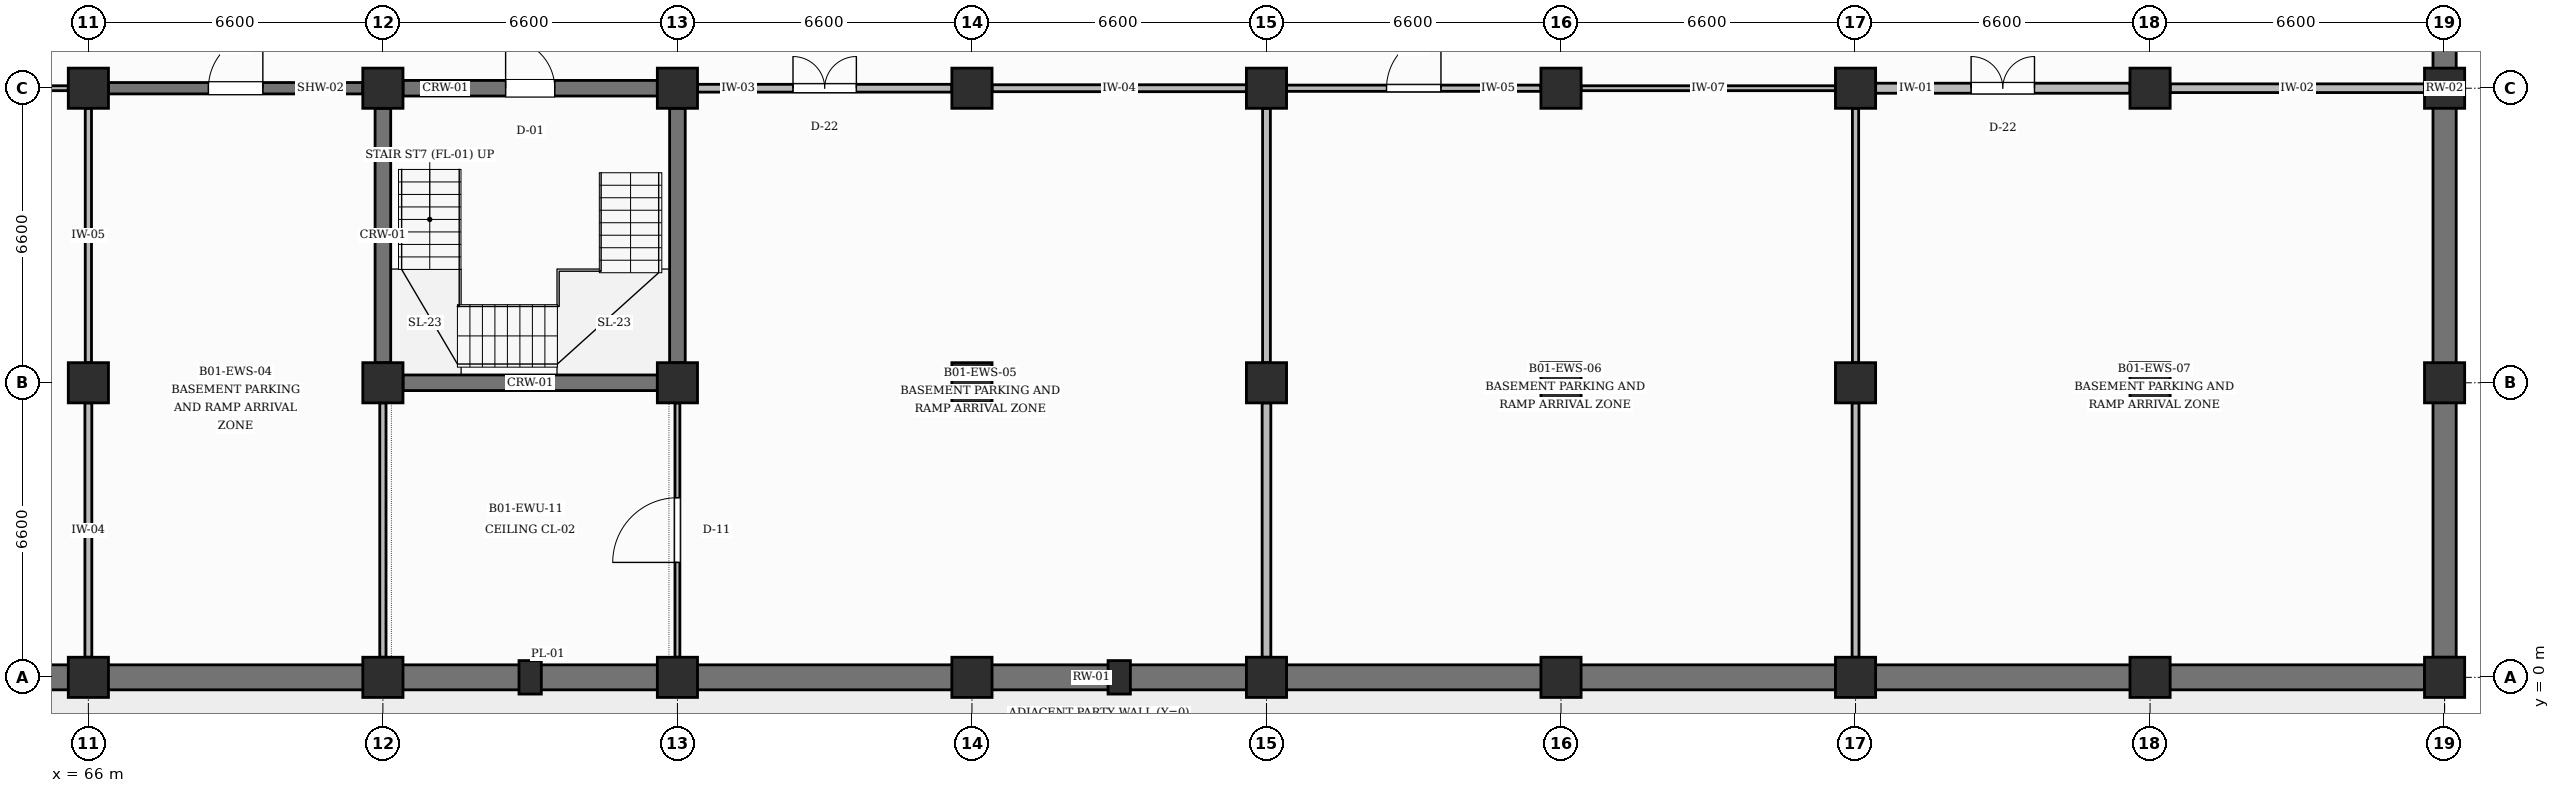
"""IFC4 building model, lengths in metres.
Left out: names, types, materials, properties, quantities, classifications, styles, units other than length and angle.
Written with IfcOpenShell. Run it as: python <this file> out.ifc"""

import sys

from ifc_helpers import new_model, si_unit, direction, frame, frame_2d, origin, origin_2d, place, context, subcontext, project, spatial, rectangle, extrude, element, fill, save


model = new_model("IFC4")
c1 = context("Model", 3, precision=1e-05, world=origin(), true_north=direction((0.0, 1.0)))
c2 = subcontext(c1, "Body", "Model", "MODEL_VIEW")
j1 = project(units=[si_unit("LENGTHUNIT", "METRE"), si_unit("PLANEANGLEUNIT", "RADIAN")], contexts=[c1])
p1 = place(None, origin())
s1 = spatial("IfcSite", under=j1, at=p1, CompositionType="ELEMENT")
p2 = place(p1, origin())
s2 = spatial("IfcBuilding", under=s1, at=p2, CompositionType="ELEMENT")
p3 = place(p2, frame((0.0, 0.0, -4.5)))
s3 = spatial("IfcBuildingStorey", under=s2, at=p3, CompositionType="ELEMENT", Elevation=-4.5)
for number, where, z_axis, x_axis in (
    (1, (75.9, 0.0, 0.0), (0.0, 0.0, 1.0), (1.0, 0.0, 0.0)),
    (2, (89.1, 0.0, 0.0), (0.0, 0.0, 1.0), (1.0, 0.0, 0.0)),
):
    element("IfcColumn", number, at=place(p3, frame(where, z_axis=z_axis, x_axis=x_axis)), inside=s3, PredefinedType="PILASTER", context=c2, shape_type="SweptSolid", body=[
        extrude(rectangle(XDim=0.5, YDim=0.75, at=origin_2d()), origin(), (0.0, 0.0, 1.0), 4.5),
    ])
for number, where, z_axis, x_axis in (
    (3, (66.0, 0.0, 0.0), (0.0, 0.0, 1.0), (1.0, 0.0, 0.0)),
    (4, (66.0, 6.6, 0.0), (0.0, 0.0, 1.0), (1.0, 0.0, 0.0)),
    (5, (66.0, 13.2, 0.0), (0.0, 0.0, 1.0), (1.0, 0.0, 0.0)),
    (6, (72.6, 0.0, 0.0), (0.0, 0.0, 1.0), (1.0, 0.0, 0.0)),
    (7, (72.6, 6.6, 0.0), (0.0, 0.0, 1.0), (1.0, 0.0, 0.0)),
    (8, (72.6, 13.2, 0.0), (0.0, 0.0, 1.0), (1.0, 0.0, 0.0)),
    (9, (79.2, 0.0, 0.0), (0.0, 0.0, 1.0), (1.0, 0.0, 0.0)),
    (10, (79.2, 6.6, 0.0), (0.0, 0.0, 1.0), (1.0, 0.0, 0.0)),
    (11, (79.2, 13.2, 0.0), (0.0, 0.0, 1.0), (1.0, 0.0, 0.0)),
    (12, (85.8, 0.0, 0.0), (0.0, 0.0, 1.0), (1.0, 0.0, 0.0)),
    (13, (85.8, 6.6, 0.0), (0.0, 0.0, 1.0), (1.0, 0.0, 0.0)),
    (14, (85.8, 13.2, 0.0), (0.0, 0.0, 1.0), (1.0, 0.0, 0.0)),
    (15, (92.4, 0.0, 0.0), (0.0, 0.0, 1.0), (1.0, 0.0, 0.0)),
    (16, (92.4, 6.6, 0.0), (0.0, 0.0, 1.0), (1.0, 0.0, 0.0)),
    (17, (92.4, 13.2, 0.0), (0.0, 0.0, 1.0), (1.0, 0.0, 0.0)),
    (18, (99.0, 0.0, 0.0), (0.0, 0.0, 1.0), (1.0, 0.0, 0.0)),
    (19, (99.0, 6.6, 0.0), (0.0, 0.0, 1.0), (1.0, 0.0, 0.0)),
    (20, (99.0, 13.2, 0.0), (0.0, 0.0, 1.0), (1.0, 0.0, 0.0)),
    (21, (105.6, 0.0, 0.0), (0.0, 0.0, 1.0), (1.0, 0.0, 0.0)),
    (22, (105.6, 6.6, 0.0), (0.0, 0.0, 1.0), (1.0, 0.0, 0.0)),
    (23, (105.6, 13.2, 0.0), (0.0, 0.0, 1.0), (1.0, 0.0, 0.0)),
    (24, (112.2, 0.0, 0.0), (0.0, 0.0, 1.0), (1.0, 0.0, 0.0)),
    (25, (112.2, 6.6, 0.0), (0.0, 0.0, 1.0), (1.0, 0.0, 0.0)),
    (26, (112.2, 13.2, 0.0), (0.0, 0.0, 1.0), (1.0, 0.0, 0.0)),
    (27, (118.8, 0.0, 0.0), (0.0, 0.0, 1.0), (1.0, 0.0, 0.0)),
    (28, (118.8, 6.6, 0.0), (0.0, 0.0, 1.0), (1.0, 0.0, 0.0)),
    (29, (118.8, 13.2, 0.0), (0.0, 0.0, 1.0), (1.0, 0.0, 0.0)),
):
    element("IfcColumn", number, at=place(p3, frame(where, z_axis=z_axis, x_axis=x_axis)), inside=s3, PredefinedType="COLUMN", context=c2, shape_type="SweptSolid", body=[
        extrude(rectangle(XDim=0.9, YDim=0.9, at=origin_2d()), origin(), (0.0, 0.0, 1.0), 4.5),
    ])
for number, where, z_axis, x_axis in (
    (30, (59.85, 0.0, 0.0), (0.0, 0.0, 1.0), (1.0, 0.0, 0.0)),
    (31, (66.45, 0.0, 0.0), (0.0, 0.0, 1.0), (1.0, 0.0, 0.0)),
    (32, (73.05, 0.0, 0.0), (0.0, 0.0, 1.0), (1.0, 0.0, 0.0)),
):
    element("IfcWall", number, at=place(p3, frame(where, z_axis=z_axis, x_axis=x_axis)), inside=s3, PredefinedType="USERDEFINED", context=c2, shape_type="SweptSolid", body=[
        extrude(rectangle(XDim=5.7, YDim=0.56, at=frame_2d((2.85, 0.0))), origin(), (0.0, 0.0, 1.0), 3.49),
    ])
p4 = place(p3, frame((79.65, 0.0, 0.0), z_axis=(0.0, 0.0, 1.0), x_axis=(1.0, 0.0, 0.0)))
e33 = element("IfcWall", 33, at=p4, inside=s3, PredefinedType="USERDEFINED", context=c2, shape_type="SweptSolid", body=[
    extrude(rectangle(XDim=5.7, YDim=0.56, at=frame_2d((2.85, 0.0))), origin(), (0.0, 0.0, 1.0), 3.49),
])
for number, where, z_axis, x_axis in (
    (34, (86.25, 0.0, 0.0), (0.0, 0.0, 1.0), (1.0, 0.0, 0.0)),
    (35, (92.85, 0.0, 0.0), (0.0, 0.0, 1.0), (1.0, 0.0, 0.0)),
    (36, (99.45, 0.0, 0.0), (0.0, 0.0, 1.0), (1.0, 0.0, 0.0)),
    (37, (106.05, 0.0, 0.0), (0.0, 0.0, 1.0), (1.0, 0.0, 0.0)),
):
    element("IfcWall", number, at=place(p3, frame(where, z_axis=z_axis, x_axis=x_axis)), inside=s3, PredefinedType="USERDEFINED", context=c2, shape_type="SweptSolid", body=[
        extrude(rectangle(XDim=5.7, YDim=0.56, at=frame_2d((2.85, 0.0))), origin(), (0.0, 0.0, 1.0), 3.49),
    ])
p5 = place(p3, frame((112.65, 0.0, 0.0), z_axis=(0.0, 0.0, 1.0), x_axis=(1.0, 0.0, 0.0)))
e38 = element("IfcWall", 38, at=p5, inside=s3, PredefinedType="USERDEFINED", context=c2, shape_type="SweptSolid", body=[
    extrude(rectangle(XDim=5.7, YDim=0.56, at=frame_2d((2.85, 0.0))), origin(), (0.0, 0.0, 1.0), 3.49),
])
for number, where, z_axis, x_axis in (
    (39, (118.8, 0.45, 0.0), (0.0, 0.0, 1.0), (0.0, 1.0, 0.0)),
    (40, (118.8, 7.05, 0.0), (0.0, 0.0, 1.0), (0.0, 1.0, 0.0)),
):
    element("IfcWall", number, at=place(p3, frame(where, z_axis=z_axis, x_axis=x_axis)), inside=s3, PredefinedType="USERDEFINED", context=c2, shape_type="SweptSolid", body=[
        extrude(rectangle(XDim=5.7, YDim=0.52, at=frame_2d((2.85, 0.0))), origin(), (0.0, 0.0, 1.0), 3.49),
    ])
p6 = place(p3, frame((118.8, 13.65, 0.0), z_axis=(0.0, 0.0, 1.0), x_axis=(0.0, 1.0, 0.0)))
e41 = element("IfcWall", 41, at=p6, inside=s3, PredefinedType="USERDEFINED", context=c2, shape_type="SweptSolid", body=[
    extrude(rectangle(XDim=5.7, YDim=0.52, at=frame_2d((2.85, 0.0))), origin(), (0.0, 0.0, 1.0), 3.49),
])
p7 = place(p3, frame((73.05, 6.6, 0.0), z_axis=(0.0, 0.0, 1.0), x_axis=(1.0, 0.0, 0.0)))
e42 = element("IfcWall", 42, at=p7, inside=s3, PredefinedType="SHEAR", context=c2, shape_type="SweptSolid", body=[
    extrude(rectangle(XDim=5.7, YDim=0.35, at=frame_2d((2.85, 0.0))), origin(), (0.0, 0.0, 1.0), 3.24),
])
p8 = place(p3, frame((73.05, 13.2, 0.0), z_axis=(0.0, 0.0, 1.0), x_axis=(1.0, 0.0, 0.0)))
e43 = element("IfcWall", 43, at=p8, inside=s3, PredefinedType="SHEAR", context=c2, shape_type="SweptSolid", body=[
    extrude(rectangle(XDim=5.7, YDim=0.35, at=frame_2d((2.85, 0.0))), origin(), (0.0, 0.0, 1.0), 3.34),
])
p9 = place(p8, frame((2.3, 0.0, 0.0)))
e44 = element("IfcOpeningElement", 44, at=p9, cuts=e43, PredefinedType="OPENING", context=c2, shape_type="SweptSolid", body=[
    extrude(rectangle(XDim=1.1, YDim=2.15, at=frame_2d((0.55, 1.075))), frame((0.0, 0.185, 0.0), z_axis=(0.0, -1.0, 0.0), x_axis=(1.0, 0.0, 0.0)), (0.0, 0.0, 1.0), 0.37),
])
for number, where, z_axis, x_axis in (
    (45, (72.6, 7.05, 0.0), (0.0, 0.0, 1.0), (0.0, 1.0, 0.0)),
    (46, (79.2, 7.05, 0.0), (0.0, 0.0, 1.0), (0.0, 1.0, 0.0)),
):
    element("IfcWall", number, at=place(p3, frame(where, z_axis=z_axis, x_axis=x_axis)), inside=s3, PredefinedType="SHEAR", context=c2, shape_type="SweptSolid", body=[
        extrude(rectangle(XDim=5.7, YDim=0.35, at=frame_2d((2.85, 0.0))), origin(), (0.0, 0.0, 1.0), 3.34),
    ])
p10 = place(p3, frame((66.0, 0.45, 0.0), z_axis=(0.0, 0.0, 1.0), x_axis=(0.0, 1.0, 0.0)))
e47 = element("IfcWall", 47, at=p10, inside=s3, PredefinedType="PARTITIONING", context=c2, shape_type="SweptSolid", body=[
    extrude(rectangle(XDim=5.7, YDim=0.155, at=frame_2d((2.85, 0.0))), origin(), (0.0, 0.0, 1.0), 3.34),
])
p11 = place(p3, frame((66.0, 7.05, 0.0), z_axis=(0.0, 0.0, 1.0), x_axis=(0.0, 1.0, 0.0)))
e48 = element("IfcWall", 48, at=p11, inside=s3, PredefinedType="PARTITIONING", context=c2, shape_type="SweptSolid", body=[
    extrude(rectangle(XDim=5.7, YDim=0.14, at=frame_2d((2.85, 0.0))), origin(), (0.0, 0.0, 1.0), 3.34),
])
p12 = place(p3, frame((59.85, 13.2, 0.0), z_axis=(0.0, 0.0, 1.0), x_axis=(1.0, 0.0, 0.0)))
e49 = element("IfcWall", 49, at=p12, inside=s3, PredefinedType="PARTITIONING", context=c2, shape_type="SweptSolid", body=[
    extrude(rectangle(XDim=5.7, YDim=0.11, at=frame_2d((2.85, 0.0))), origin(), (0.0, 0.0, 1.0), 3.34),
])
p13 = place(p3, frame((72.6, 0.45, 0.0), z_axis=(0.0, 0.0, 1.0), x_axis=(0.0, 1.0, 0.0)))
e50 = element("IfcWall", 50, at=p13, inside=s3, PredefinedType="PARTITIONING", context=c2, shape_type="SweptSolid", body=[
    extrude(rectangle(XDim=5.7, YDim=0.14, at=frame_2d((2.85, 0.0))), origin(), (0.0, 0.0, 1.0), 3.34),
])
p14 = place(p3, frame((66.45, 13.2, 0.0), z_axis=(0.0, 0.0, 1.0), x_axis=(1.0, 0.0, 0.0)))
e51 = element("IfcWall", 51, at=p14, inside=s3, PredefinedType="SHEAR", context=c2, shape_type="SweptSolid", body=[
    extrude(rectangle(XDim=5.7, YDim=0.255, at=frame_2d((2.85, 0.0))), origin(), (0.0, 0.0, 1.0), 3.24),
])
p15 = place(p14, frame((2.24, 0.0, 0.0)))
e52 = element("IfcOpeningElement", 52, at=p15, cuts=e51, PredefinedType="OPENING", context=c2, shape_type="SweptSolid", body=[
    extrude(rectangle(XDim=1.22, YDim=2.15, at=frame_2d((0.61, 1.075))), frame((0.0, 0.137, 0.0), z_axis=(0.0, -1.0, 0.0), x_axis=(1.0, 0.0, 0.0)), (0.0, 0.0, 1.0), 0.275),
])
p16 = place(p3, frame((79.2, 0.45, 0.0), z_axis=(0.0, 0.0, 1.0), x_axis=(0.0, 1.0, 0.0)))
e53 = element("IfcWall", 53, at=p16, inside=s3, PredefinedType="PARTITIONING", context=c2, shape_type="SweptSolid", body=[
    extrude(rectangle(XDim=5.7, YDim=0.11, at=frame_2d((2.85, 0.0))), origin(), (0.0, 0.0, 1.0), 3.34),
])
p17 = place(p16, frame((2.125, 0.0, 0.0)))
e54 = element("IfcOpeningElement", 54, at=p17, cuts=e53, PredefinedType="OPENING", context=c2, shape_type="SweptSolid", body=[
    extrude(rectangle(XDim=1.45, YDim=2.25, at=frame_2d((0.725, 1.125))), frame((0.0, 0.065, 0.0), z_axis=(0.0, -1.0, 0.0), x_axis=(1.0, 0.0, 0.0)), (0.0, 0.0, 1.0), 0.13),
])
p18 = place(p3, frame((79.65, 13.2, 0.0), z_axis=(0.0, 0.0, 1.0), x_axis=(1.0, 0.0, 0.0)))
e55 = element("IfcWall", 55, at=p18, inside=s3, PredefinedType="PARTITIONING", context=c2, shape_type="SweptSolid", body=[
    extrude(rectangle(XDim=5.7, YDim=0.175, at=frame_2d((2.85, 0.0))), origin(), (0.0, 0.0, 1.0), 3.24),
])
p19 = place(p18, frame((2.14, 0.0, 0.0)))
e56 = element("IfcOpeningElement", 56, at=p19, cuts=e55, PredefinedType="OPENING", context=c2, shape_type="SweptSolid", body=[
    extrude(rectangle(XDim=1.42, YDim=2.2, at=frame_2d((0.71, 1.1))), frame((0.0, 0.097, 0.0), z_axis=(0.0, -1.0, 0.0), x_axis=(1.0, 0.0, 0.0)), (0.0, 0.0, 1.0), 0.195),
])
p20 = place(p3, frame((92.4, 0.45, 0.0), z_axis=(0.0, 0.0, 1.0), x_axis=(0.0, 1.0, 0.0)))
e57 = element("IfcWall", 57, at=p20, inside=s3, PredefinedType="PARTITIONING", context=c2, shape_type="SweptSolid", body=[
    extrude(rectangle(XDim=5.7, YDim=0.195, at=frame_2d((2.85, 0.0))), origin(), (0.0, 0.0, 1.0), 3.34),
])
p21 = place(p3, frame((92.4, 7.05, 0.0), z_axis=(0.0, 0.0, 1.0), x_axis=(0.0, 1.0, 0.0)))
e58 = element("IfcWall", 58, at=p21, inside=s3, PredefinedType="PARTITIONING", context=c2, shape_type="SweptSolid", body=[
    extrude(rectangle(XDim=5.7, YDim=0.175, at=frame_2d((2.85, 0.0))), origin(), (0.0, 0.0, 1.0), 3.34),
])
p22 = place(p3, frame((86.25, 13.2, 0.0), z_axis=(0.0, 0.0, 1.0), x_axis=(1.0, 0.0, 0.0)))
e59 = element("IfcWall", 59, at=p22, inside=s3, PredefinedType="PARTITIONING", context=c2, shape_type="SweptSolid", body=[
    extrude(rectangle(XDim=5.7, YDim=0.155, at=frame_2d((2.85, 0.0))), origin(), (0.0, 0.0, 1.0), 3.34),
])
p23 = place(p3, frame((92.85, 13.2, 0.0), z_axis=(0.0, 0.0, 1.0), x_axis=(1.0, 0.0, 0.0)))
e60 = element("IfcWall", 60, at=p23, inside=s3, PredefinedType="PARTITIONING", context=c2, shape_type="SweptSolid", body=[
    extrude(rectangle(XDim=5.7, YDim=0.14, at=frame_2d((2.85, 0.0))), origin(), (0.0, 0.0, 1.0), 3.24),
])
p24 = place(p23, frame((2.24, 0.0, 0.0)))
e61 = element("IfcOpeningElement", 61, at=p24, cuts=e60, PredefinedType="OPENING", context=c2, shape_type="SweptSolid", body=[
    extrude(rectangle(XDim=1.22, YDim=2.15, at=frame_2d((0.61, 1.075))), frame((0.0, 0.08, 0.0), z_axis=(0.0, -1.0, 0.0), x_axis=(1.0, 0.0, 0.0)), (0.0, 0.0, 1.0), 0.16),
])
p25 = place(p3, frame((105.6, 0.45, 0.0), z_axis=(0.0, 0.0, 1.0), x_axis=(0.0, 1.0, 0.0)))
e62 = element("IfcWall", 62, at=p25, inside=s3, PredefinedType="PARTITIONING", context=c2, shape_type="SweptSolid", body=[
    extrude(rectangle(XDim=5.7, YDim=0.155, at=frame_2d((2.85, 0.0))), origin(), (0.0, 0.0, 1.0), 3.34),
])
p26 = place(p3, frame((105.6, 7.05, 0.0), z_axis=(0.0, 0.0, 1.0), x_axis=(0.0, 1.0, 0.0)))
e63 = element("IfcWall", 63, at=p26, inside=s3, PredefinedType="PARTITIONING", context=c2, shape_type="SweptSolid", body=[
    extrude(rectangle(XDim=5.7, YDim=0.14, at=frame_2d((2.85, 0.0))), origin(), (0.0, 0.0, 1.0), 3.34),
])
p27 = place(p3, frame((99.45, 13.2, 0.0), z_axis=(0.0, 0.0, 1.0), x_axis=(1.0, 0.0, 0.0)))
e64 = element("IfcWall", 64, at=p27, inside=s3, PredefinedType="PARTITIONING", context=c2, shape_type="SweptSolid", body=[
    extrude(rectangle(XDim=5.7, YDim=0.11, at=frame_2d((2.85, 0.0))), origin(), (0.0, 0.0, 1.0), 3.34),
])
p28 = place(p3, frame((106.05, 13.2, 0.0), z_axis=(0.0, 0.0, 1.0), x_axis=(1.0, 0.0, 0.0)))
e65 = element("IfcWall", 65, at=p28, inside=s3, PredefinedType="PARTITIONING", context=c2, shape_type="SweptSolid", body=[
    extrude(rectangle(XDim=5.7, YDim=0.225, at=frame_2d((2.85, 0.0))), origin(), (0.0, 0.0, 1.0), 3.24),
])
p29 = place(p28, frame((2.14, 0.0, 0.0)))
e66 = element("IfcOpeningElement", 66, at=p29, cuts=e65, PredefinedType="OPENING", context=c2, shape_type="SweptSolid", body=[
    extrude(rectangle(XDim=1.42, YDim=2.2, at=frame_2d((0.71, 1.1))), frame((0.0, 0.123, 0.0), z_axis=(0.0, -1.0, 0.0), x_axis=(1.0, 0.0, 0.0)), (0.0, 0.0, 1.0), 0.245),
])
p30 = place(p3, frame((112.65, 13.2, 0.0), z_axis=(0.0, 0.0, 1.0), x_axis=(1.0, 0.0, 0.0)))
e67 = element("IfcWall", 67, at=p30, inside=s3, PredefinedType="PARTITIONING", context=c2, shape_type="SweptSolid", body=[
    extrude(rectangle(XDim=5.7, YDim=0.195, at=frame_2d((2.85, 0.0))), origin(), (0.0, 0.0, 1.0), 3.34),
])
p31 = place(p9, origin())
e68 = element("IfcDoor", 68, at=p31, inside=s3, OperationType="SINGLE_SWING_LEFT", PredefinedType="DOOR", context=c2, shape_type="SweptSolid", body=[
    extrude(rectangle(XDim=1.1, YDim=2.15, at=frame_2d((0.55, 1.075))), frame((0.0, 0.025, 0.0), z_axis=(0.0, -1.0, 0.0), x_axis=(1.0, 0.0, 0.0)), (0.0, 0.0, 1.0), 0.05),
])
fill(e44, e68)
p32 = place(p15, origin())
e69 = element("IfcDoor", 69, at=p32, inside=s3, OperationType="SINGLE_SWING_RIGHT", PredefinedType="DOOR", context=c2, shape_type="SweptSolid", body=[
    extrude(rectangle(XDim=1.22, YDim=2.15, at=frame_2d((0.61, 1.075))), frame((0.0, 0.025, 0.0), z_axis=(0.0, -1.0, 0.0), x_axis=(1.0, 0.0, 0.0)), (0.0, 0.0, 1.0), 0.05),
])
fill(e52, e69)
p33 = place(p19, origin())
e70 = element("IfcDoor", 70, at=p33, inside=s3, OperationType="DOUBLE_DOOR_SINGLE_SWING", PredefinedType="DOOR", context=c2, shape_type="SweptSolid", body=[
    extrude(rectangle(XDim=1.42, YDim=2.2, at=frame_2d((0.71, 1.1))), frame((0.0, 0.025, 0.0), z_axis=(0.0, -1.0, 0.0), x_axis=(1.0, 0.0, 0.0)), (0.0, 0.0, 1.0), 0.05),
])
fill(e56, e70)
p34 = place(p24, origin())
e71 = element("IfcDoor", 71, at=p34, inside=s3, OperationType="SINGLE_SWING_RIGHT", PredefinedType="DOOR", context=c2, shape_type="SweptSolid", body=[
    extrude(rectangle(XDim=1.22, YDim=2.15, at=frame_2d((0.61, 1.075))), frame((0.0, 0.025, 0.0), z_axis=(0.0, -1.0, 0.0), x_axis=(1.0, 0.0, 0.0)), (0.0, 0.0, 1.0), 0.05),
])
fill(e61, e71)
p35 = place(p29, origin())
e72 = element("IfcDoor", 72, at=p35, inside=s3, OperationType="DOUBLE_DOOR_SINGLE_SWING", PredefinedType="DOOR", context=c2, shape_type="SweptSolid", body=[
    extrude(rectangle(XDim=1.42, YDim=2.2, at=frame_2d((0.71, 1.1))), frame((0.0, 0.025, 0.0), z_axis=(0.0, -1.0, 0.0), x_axis=(1.0, 0.0, 0.0)), (0.0, 0.0, 1.0), 0.05),
])
fill(e66, e72)
p36 = place(p17, origin())
e73 = element("IfcDoor", 73, at=p36, inside=s3, OperationType="SINGLE_SWING_LEFT", PredefinedType="DOOR", context=c2, shape_type="SweptSolid", body=[
    extrude(rectangle(XDim=1.45, YDim=2.25, at=frame_2d((0.725, 1.125))), frame((0.0, 0.025, 0.0), z_axis=(0.0, -1.0, 0.0), x_axis=(1.0, 0.0, 0.0)), (0.0, 0.0, 1.0), 0.05),
])
fill(e54, e73)
save(model, sys.argv[1])
